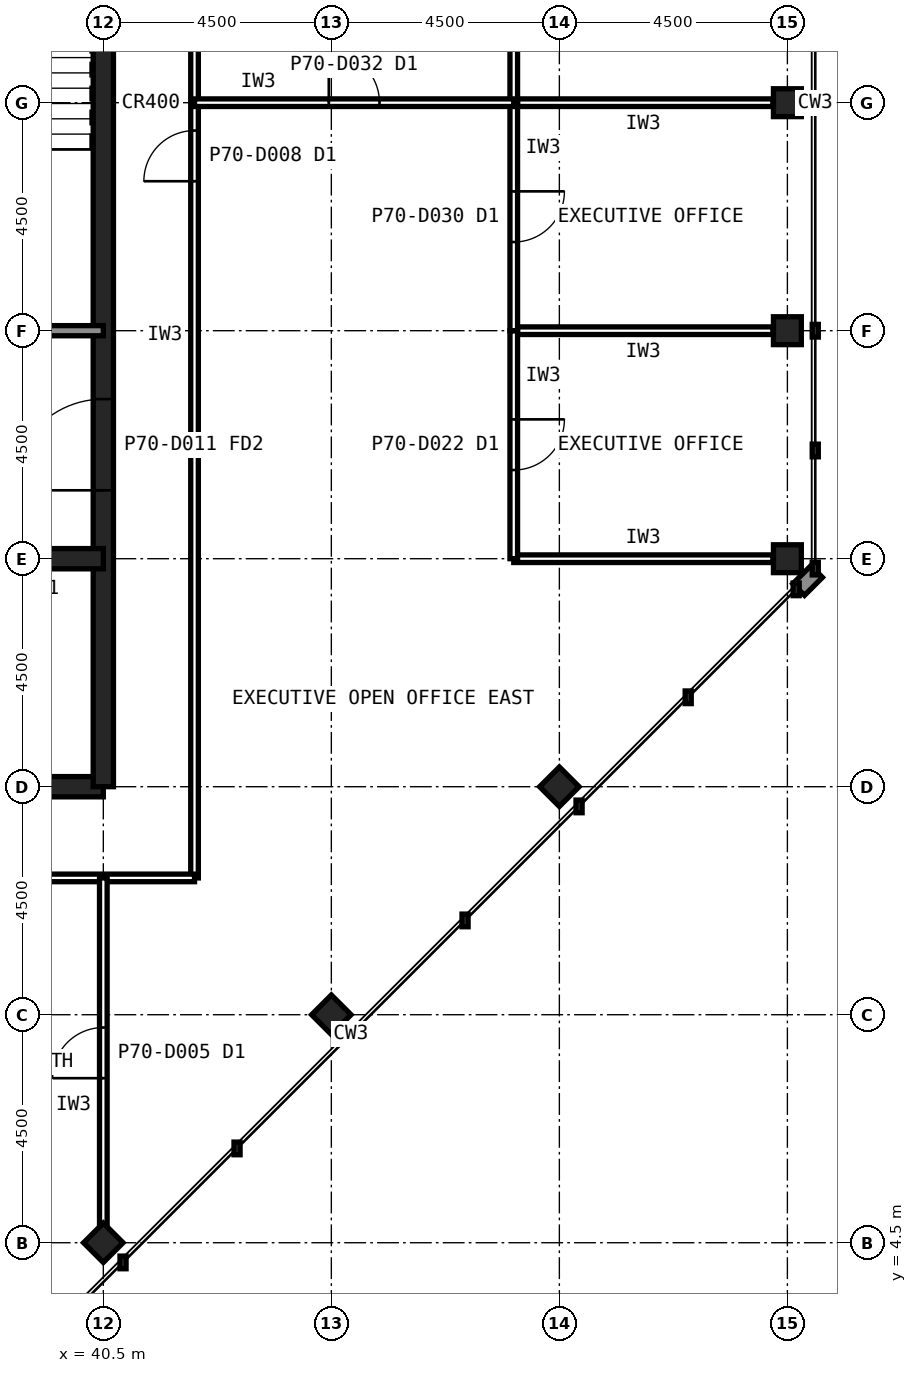
"""IFC4 building model, lengths in metres.
Left out: names, types, materials, properties, quantities, classifications, styles, units other than length and angle.
Written with IfcOpenShell. Run it as: python <this file> out.ifc"""

import sys

from ifc_helpers import new_model, si_unit, direction, frame, frame_2d, origin, origin_2d, place, context, subcontext, project, spatial, rectangle, hollow_rectangle, extrude, element, fill, save


model = new_model("IFC4")
c1 = context("Model", 3, precision=1e-05, world=origin(), true_north=direction((0.0, 1.0)))
c2 = subcontext(c1, "Body", "Model", "MODEL_VIEW")
j1 = project(units=[si_unit("LENGTHUNIT", "METRE"), si_unit("PLANEANGLEUNIT", "RADIAN")], contexts=[c1])
p1 = place(None, origin())
s1 = spatial("IfcSite", under=j1, at=p1, CompositionType="ELEMENT")
p2 = place(p1, origin())
s2 = spatial("IfcBuilding", under=s1, at=p2, CompositionType="ELEMENT")
p3 = place(p2, frame((0.0, 0.0, 294.6)))
s3 = spatial("IfcBuildingStorey", under=s2, at=p3, CompositionType="ELEMENT", Elevation=294.6)
for number, where, z_axis, x_axis in (
    (1, (54.0, 18.0, 0.0), (0.0, 0.0, 1.0), (1.0, 0.0, 0.0)),
    (2, (54.0, 22.5, 0.0), (0.0, 0.0, 1.0), (1.0, 0.0, 0.0)),
    (3, (54.0, 27.0, 0.0), (0.0, 0.0, 1.0), (1.0, 0.0, 0.0)),
    (4, (40.5, 4.5, 0.0), (0.0, 0.0, 1.0), (0.707, 0.707, 0.0)),
    (5, (45.0, 9.0, 0.0), (0.0, 0.0, 1.0), (0.707, 0.707, 0.0)),
    (6, (49.5, 13.5, 0.0), (0.0, 0.0, 1.0), (0.707, 0.707, 0.0)),
):
    element("IfcColumn", number, at=place(p3, frame(where, z_axis=z_axis, x_axis=x_axis)), inside=s3, PredefinedType="COLUMN", context=c2, shape_type="SweptSolid", body=[
        extrude(hollow_rectangle(XDim=0.55, YDim=0.55, WallThickness=0.025, at=origin_2d()), origin(), (0.0, 0.0, 1.0), 4.0),
    ])
p4 = place(p3, frame((13.5, 13.5, 0.0), z_axis=(0.0, 0.0, 1.0), x_axis=(1.0, 0.0, 0.0)))
e7 = element("IfcWall", 7, at=p4, inside=s3, PredefinedType="SHEAR", context=c2, shape_type="SweptSolid", body=[
    extrude(rectangle(XDim=27.0, YDim=0.4, at=frame_2d((13.5, 0.0))), origin(), (0.0, 0.0, 1.0), 4.0),
])
p5 = place(p3, frame((40.5, 13.5, 0.0), z_axis=(0.0, 0.0, 1.0), x_axis=(0.0, 1.0, 0.0)))
e8 = element("IfcWall", 8, at=p5, inside=s3, PredefinedType="SHEAR", context=c2, shape_type="SweptSolid", body=[
    extrude(rectangle(XDim=27.0, YDim=0.4, at=frame_2d((13.5, 0.0))), origin(), (0.0, 0.0, 1.0), 4.0),
])
p6 = place(p5, frame((5.85, 0.0, 0.0)))
e9 = element("IfcOpeningElement", 9, at=p6, cuts=e8, PredefinedType="OPENING", context=c2, shape_type="SweptSolid", body=[
    extrude(rectangle(XDim=1.8, YDim=2.1, at=frame_2d((0.9, 1.05))), frame((0.0, 0.21, 0.0), z_axis=(0.0, -1.0, 0.0), x_axis=(1.0, 0.0, 0.0)), (0.0, 0.0, 1.0), 0.42),
])
p7 = place(p5, frame((19.65, 0.0, 0.0)))
e10 = element("IfcOpeningElement", 10, at=p7, cuts=e8, PredefinedType="OPENING", context=c2, shape_type="SweptSolid", body=[
    extrude(rectangle(XDim=1.2, YDim=2.1, at=frame_2d((0.6, 1.05))), frame((0.0, 0.21, 0.0), z_axis=(0.0, -1.0, 0.0), x_axis=(1.0, 0.0, 0.0)), (0.0, 0.0, 1.0), 0.42),
])
p8 = place(p3, frame((13.5, 18.0, 0.0), z_axis=(0.0, 0.0, 1.0), x_axis=(1.0, 0.0, 0.0)))
e11 = element("IfcWall", 11, at=p8, inside=s3, PredefinedType="SHEAR", context=c2, shape_type="SweptSolid", body=[
    extrude(rectangle(XDim=27.0, YDim=0.4, at=frame_2d((13.5, 0.0))), origin(), (0.0, 0.0, 1.0), 4.0),
])
p9 = place(p8, frame((24.3, 0.0, 0.0)))
e12 = element("IfcOpeningElement", 12, at=p9, cuts=e11, PredefinedType="OPENING", context=c2, shape_type="SweptSolid", body=[
    extrude(rectangle(XDim=0.9, YDim=2.1, at=frame_2d((0.45, 1.05))), frame((0.0, 0.21, 0.0), z_axis=(0.0, -1.0, 0.0), x_axis=(1.0, 0.0, 0.0)), (0.0, 0.0, 1.0), 0.42),
])
p10 = place(p8, frame((5.45, 0.0, 0.0)))
e13 = element("IfcOpeningElement", 13, at=p10, cuts=e11, PredefinedType="OPENING", context=c2, shape_type="SweptSolid", body=[
    extrude(rectangle(XDim=1.1, YDim=2.1, at=frame_2d((0.55, 1.05))), frame((0.0, 0.21, 0.0), z_axis=(0.0, -1.0, 0.0), x_axis=(1.0, 0.0, 0.0)), (0.0, 0.0, 1.0), 0.42),
])
p11 = place(p8, frame((8.45, 0.0, 0.0)))
e14 = element("IfcOpeningElement", 14, at=p11, cuts=e11, PredefinedType="OPENING", context=c2, shape_type="SweptSolid", body=[
    extrude(rectangle(XDim=1.1, YDim=2.1, at=frame_2d((0.55, 1.05))), frame((0.0, 0.21, 0.0), z_axis=(0.0, -1.0, 0.0), x_axis=(1.0, 0.0, 0.0)), (0.0, 0.0, 1.0), 0.42),
])
p12 = place(p8, frame((11.45, 0.0, 0.0)))
e15 = element("IfcOpeningElement", 15, at=p12, cuts=e11, PredefinedType="OPENING", context=c2, shape_type="SweptSolid", body=[
    extrude(rectangle(XDim=1.1, YDim=2.1, at=frame_2d((0.55, 1.05))), frame((0.0, 0.21, 0.0), z_axis=(0.0, -1.0, 0.0), x_axis=(1.0, 0.0, 0.0)), (0.0, 0.0, 1.0), 0.42),
])
p13 = place(p8, frame((14.45, 0.0, 0.0)))
e16 = element("IfcOpeningElement", 16, at=p13, cuts=e11, PredefinedType="OPENING", context=c2, shape_type="SweptSolid", body=[
    extrude(rectangle(XDim=1.1, YDim=2.1, at=frame_2d((0.55, 1.05))), frame((0.0, 0.21, 0.0), z_axis=(0.0, -1.0, 0.0), x_axis=(1.0, 0.0, 0.0)), (0.0, 0.0, 1.0), 0.42),
])
p14 = place(p8, frame((17.45, 0.0, 0.0)))
e17 = element("IfcOpeningElement", 17, at=p14, cuts=e11, PredefinedType="OPENING", context=c2, shape_type="SweptSolid", body=[
    extrude(rectangle(XDim=1.1, YDim=2.1, at=frame_2d((0.55, 1.05))), frame((0.0, 0.21, 0.0), z_axis=(0.0, -1.0, 0.0), x_axis=(1.0, 0.0, 0.0)), (0.0, 0.0, 1.0), 0.42),
])
p15 = place(p8, frame((20.45, 0.0, 0.0)))
e18 = element("IfcOpeningElement", 18, at=p15, cuts=e11, PredefinedType="OPENING", context=c2, shape_type="SweptSolid", body=[
    extrude(rectangle(XDim=1.1, YDim=2.1, at=frame_2d((0.55, 1.05))), frame((0.0, 0.21, 0.0), z_axis=(0.0, -1.0, 0.0), x_axis=(1.0, 0.0, 0.0)), (0.0, 0.0, 1.0), 0.42),
])
p16 = place(p8, frame((1.6, 0.0, 0.0)))
e19 = element("IfcOpeningElement", 19, at=p16, cuts=e11, PredefinedType="OPENING", context=c2, shape_type="SweptSolid", body=[
    extrude(rectangle(XDim=1.3, YDim=2.2, at=frame_2d((0.65, 1.1))), frame((0.0, 0.21, 0.0), z_axis=(0.0, -1.0, 0.0), x_axis=(1.0, 0.0, 0.0)), (0.0, 0.0, 1.0), 0.42),
])
p17 = place(p3, frame((13.5, 22.5, 0.0), z_axis=(0.0, 0.0, 1.0), x_axis=(1.0, 0.0, 0.0)))
e20 = element("IfcWall", 20, at=p17, inside=s3, PredefinedType="SOLIDWALL", context=c2, shape_type="SweptSolid", body=[
    extrude(rectangle(XDim=27.0, YDim=0.2, at=frame_2d((13.5, 0.0))), origin(), (0.0, 0.0, 1.0), 3.84),
])
p18 = place(p17, frame((1.65, 0.0, 0.0)))
e21 = element("IfcOpeningElement", 21, at=p18, cuts=e20, PredefinedType="OPENING", context=c2, shape_type="SweptSolid", body=[
    extrude(rectangle(XDim=1.2, YDim=2.1, at=frame_2d((0.6, 1.05))), frame((0.0, 0.11, 0.0), z_axis=(0.0, -1.0, 0.0), x_axis=(1.0, 0.0, 0.0)), (0.0, 0.0, 1.0), 0.22),
])
p19 = place(p17, frame((6.025, 0.0, 0.0)))
e22 = element("IfcOpeningElement", 22, at=p19, cuts=e20, PredefinedType="OPENING", context=c2, shape_type="SweptSolid", body=[
    extrude(rectangle(XDim=1.0, YDim=2.1, at=frame_2d((0.5, 1.05))), frame((0.0, 0.11, 0.0), z_axis=(0.0, -1.0, 0.0), x_axis=(1.0, 0.0, 0.0)), (0.0, 0.0, 1.0), 0.22),
])
p20 = place(p17, frame((10.525, 0.0, 0.0)))
e23 = element("IfcOpeningElement", 23, at=p20, cuts=e20, PredefinedType="OPENING", context=c2, shape_type="SweptSolid", body=[
    extrude(rectangle(XDim=1.0, YDim=2.1, at=frame_2d((0.5, 1.05))), frame((0.0, 0.11, 0.0), z_axis=(0.0, -1.0, 0.0), x_axis=(1.0, 0.0, 0.0)), (0.0, 0.0, 1.0), 0.22),
])
p21 = place(p17, frame((19.75, 0.0, 0.0)))
e24 = element("IfcOpeningElement", 24, at=p21, cuts=e20, PredefinedType="OPENING", context=c2, shape_type="SweptSolid", body=[
    extrude(rectangle(XDim=1.0, YDim=2.1, at=frame_2d((0.5, 1.05))), frame((0.0, 0.11, 0.0), z_axis=(0.0, -1.0, 0.0), x_axis=(1.0, 0.0, 0.0)), (0.0, 0.0, 1.0), 0.22),
])
p22 = place(p17, frame((15.05, 0.0, 0.0)))
e25 = element("IfcOpeningElement", 25, at=p22, cuts=e20, PredefinedType="OPENING", context=c2, shape_type="SweptSolid", body=[
    extrude(rectangle(XDim=1.4, YDim=2.4, at=frame_2d((0.7, 1.2))), frame((0.0, 0.11, 0.0), z_axis=(0.0, -1.0, 0.0), x_axis=(1.0, 0.0, 0.0)), (0.0, 0.0, 1.0), 0.22),
])
p23 = place(p3, frame((42.3, 11.7, 0.0), z_axis=(0.0, 0.0, 1.0), x_axis=(0.0, 1.0, 0.0)))
e26 = element("IfcWall", 26, at=p23, inside=s3, PredefinedType="PARTITIONING", context=c2, shape_type="SweptSolid", body=[
    extrude(rectangle(XDim=30.6, YDim=0.15, at=frame_2d((15.3, 0.0))), origin(), (0.0, 0.0, 1.0), 3.84),
])
p24 = place(p23, frame((13.75, 0.0, 0.0)))
e27 = element("IfcOpeningElement", 27, at=p24, cuts=e26, PredefinedType="OPENING", context=c2, shape_type="SweptSolid", body=[
    extrude(rectangle(XDim=1.0, YDim=2.1, at=frame_2d((0.5, 1.05))), frame((0.0, 0.085, 0.0), z_axis=(0.0, -1.0, 0.0), x_axis=(1.0, 0.0, 0.0)), (0.0, 0.0, 1.0), 0.17),
])
p25 = place(p3, frame((28.8, 11.7, 0.0), z_axis=(0.0, 0.0, 1.0), x_axis=(1.0, 0.0, 0.0)))
e28 = element("IfcWall", 28, at=p25, inside=s3, PredefinedType="PARTITIONING", context=c2, shape_type="SweptSolid", body=[
    extrude(rectangle(XDim=13.5, YDim=0.15, at=frame_2d((6.75, 0.0))), origin(), (0.0, 0.0, 1.0), 3.84),
])
p26 = place(p25, frame((6.25, 0.0, 0.0)))
e29 = element("IfcOpeningElement", 29, at=p26, cuts=e28, PredefinedType="OPENING", context=c2, shape_type="SweptSolid", body=[
    extrude(rectangle(XDim=1.0, YDim=2.1, at=frame_2d((0.5, 1.05))), frame((0.0, 0.085, 0.0), z_axis=(0.0, -1.0, 0.0), x_axis=(1.0, 0.0, 0.0)), (0.0, 0.0, 1.0), 0.17),
])
for number, where, z_axis, x_axis in (
    (30, (48.6, 18.0, 0.0), (0.0, 0.0, 1.0), (1.0, 0.0, 0.0)),
    (31, (53.715, 22.5, 0.0), (0.0, 0.0, 1.0), (-1.0, 0.0, 0.0)),
):
    element("IfcWall", number, at=place(p3, frame(where, z_axis=z_axis, x_axis=x_axis)), inside=s3, PredefinedType="PARTITIONING", context=c2, shape_type="SweptSolid", body=[
        extrude(rectangle(XDim=5.115, YDim=0.15, at=frame_2d((2.558, 0.0))), origin(), (0.0, 0.0, 1.0), 2.989),
    ])
p27 = place(p3, frame((48.6, 22.5, 0.0), z_axis=(0.0, 0.0, 1.0), x_axis=(0.0, -1.0, 0.0)))
e32 = element("IfcWall", 32, at=p27, inside=s3, PredefinedType="PARTITIONING", context=c2, shape_type="SweptSolid", body=[
    extrude(rectangle(XDim=4.5, YDim=0.15, at=frame_2d((2.25, 0.0))), origin(), (0.0, 0.0, 1.0), 3.84),
])
p28 = place(p27, frame((1.75, 0.0, 0.0)))
e33 = element("IfcOpeningElement", 33, at=p28, cuts=e32, PredefinedType="OPENING", context=c2, shape_type="SweptSolid", body=[
    extrude(rectangle(XDim=1.0, YDim=2.1, at=frame_2d((0.5, 1.05))), frame((0.0, 0.085, 0.0), z_axis=(0.0, -1.0, 0.0), x_axis=(1.0, 0.0, 0.0)), (0.0, 0.0, 1.0), 0.17),
])
p29 = place(p3, frame((53.715, 27.0, 0.0), z_axis=(0.0, 0.0, 1.0), x_axis=(-1.0, 0.0, 0.0)))
e34 = element("IfcWall", 34, at=p29, inside=s3, PredefinedType="PARTITIONING", context=c2, shape_type="SweptSolid", body=[
    extrude(rectangle(XDim=5.115, YDim=0.15, at=frame_2d((2.558, 0.0))), origin(), (0.0, 0.0, 1.0), 2.989),
])
p30 = place(p3, frame((48.6, 27.0, 0.0), z_axis=(0.0, 0.0, 1.0), x_axis=(0.0, -1.0, 0.0)))
e35 = element("IfcWall", 35, at=p30, inside=s3, PredefinedType="PARTITIONING", context=c2, shape_type="SweptSolid", body=[
    extrude(rectangle(XDim=4.5, YDim=0.15, at=frame_2d((2.25, 0.0))), origin(), (0.0, 0.0, 1.0), 3.84),
])
p31 = place(p30, frame((1.75, 0.0, 0.0)))
e36 = element("IfcOpeningElement", 36, at=p31, cuts=e35, PredefinedType="OPENING", context=c2, shape_type="SweptSolid", body=[
    extrude(rectangle(XDim=1.0, YDim=2.1, at=frame_2d((0.5, 1.05))), frame((0.0, 0.085, 0.0), z_axis=(0.0, -1.0, 0.0), x_axis=(1.0, 0.0, 0.0)), (0.0, 0.0, 1.0), 0.17),
])
p32 = place(p3, frame((48.6, 31.5, 0.0), z_axis=(0.0, 0.0, 1.0), x_axis=(0.0, -1.0, 0.0)))
e37 = element("IfcWall", 37, at=p32, inside=s3, PredefinedType="PARTITIONING", context=c2, shape_type="SweptSolid", body=[
    extrude(rectangle(XDim=4.5, YDim=0.15, at=frame_2d((2.25, 0.0))), origin(), (0.0, 0.0, 1.0), 3.84),
])
p33 = place(p32, frame((1.75, 0.0, 0.0)))
e38 = element("IfcOpeningElement", 38, at=p33, cuts=e37, PredefinedType="OPENING", context=c2, shape_type="SweptSolid", body=[
    extrude(rectangle(XDim=1.0, YDim=2.1, at=frame_2d((0.5, 1.05))), frame((0.0, 0.085, 0.0), z_axis=(0.0, -1.0, 0.0), x_axis=(1.0, 0.0, 0.0)), (0.0, 0.0, 1.0), 0.17),
])
p34 = place(p3, frame((40.5, 4.795, 0.0), z_axis=(0.0, 0.0, 1.0), x_axis=(0.0, 1.0, 0.0)))
e39 = element("IfcWall", 39, at=p34, inside=s3, PredefinedType="PARTITIONING", context=c2, shape_type="SweptSolid", body=[
    extrude(rectangle(XDim=6.905, YDim=0.15, at=frame_2d((3.453, 0.0))), origin(), (0.0, 0.0, 1.0), 2.989),
])
p35 = place(p34, frame((2.952, 0.0, 0.0)))
e40 = element("IfcOpeningElement", 40, at=p35, cuts=e39, PredefinedType="OPENING", context=c2, shape_type="SweptSolid", body=[
    extrude(rectangle(XDim=1.0, YDim=2.1, at=frame_2d((0.5, 1.05))), frame((0.0, 0.085, 0.0), z_axis=(0.0, -1.0, 0.0), x_axis=(1.0, 0.0, 0.0)), (0.0, 0.0, 1.0), 0.17),
])
p36 = place(p3, frame((42.3, 27.0, 0.0), z_axis=(0.0, 0.0, 1.0), x_axis=(1.0, 0.0, 0.0)))
e41 = element("IfcWall", 41, at=p36, inside=s3, PredefinedType="PARTITIONING", context=c2, shape_type="SweptSolid", body=[
    extrude(rectangle(XDim=6.3, YDim=0.15, at=frame_2d((3.15, 0.0))), origin(), (0.0, 0.0, 1.0), 2.989),
])
p37 = place(p36, frame((2.65, 0.0, 0.0)))
e42 = element("IfcOpeningElement", 42, at=p37, cuts=e41, PredefinedType="OPENING", context=c2, shape_type="SweptSolid", body=[
    extrude(rectangle(XDim=1.0, YDim=2.1, at=frame_2d((0.5, 1.05))), frame((0.0, 0.085, 0.0), z_axis=(0.0, -1.0, 0.0), x_axis=(1.0, 0.0, 0.0)), (0.0, 0.0, 1.0), 0.17),
])
p38 = place(p6, origin())
e43 = element("IfcDoor", 43, at=p38, inside=s3, OperationType="SINGLE_SWING_LEFT", PredefinedType="DOOR", context=c2, shape_type="SweptSolid", body=[
    extrude(rectangle(XDim=1.8, YDim=2.1, at=frame_2d((0.9, 1.05))), frame((0.0, 0.025, 0.0), z_axis=(0.0, -1.0, 0.0), x_axis=(1.0, 0.0, 0.0)), (0.0, 0.0, 1.0), 0.05),
])
fill(e9, e43)
p39 = place(p24, origin())
e44 = element("IfcDoor", 44, at=p39, inside=s3, OperationType="SINGLE_SWING_LEFT", PredefinedType="DOOR", context=c2, shape_type="SweptSolid", body=[
    extrude(rectangle(XDim=1.0, YDim=2.1, at=frame_2d((0.5, 1.05))), frame((0.0, 0.025, 0.0), z_axis=(0.0, -1.0, 0.0), x_axis=(1.0, 0.0, 0.0)), (0.0, 0.0, 1.0), 0.05),
])
fill(e27, e44)
p40 = place(p28, origin())
e45 = element("IfcDoor", 45, at=p40, inside=s3, OperationType="SINGLE_SWING_LEFT", PredefinedType="DOOR", context=c2, shape_type="SweptSolid", body=[
    extrude(rectangle(XDim=1.0, YDim=2.1, at=frame_2d((0.5, 1.05))), frame((0.0, 0.025, 0.0), z_axis=(0.0, -1.0, 0.0), x_axis=(1.0, 0.0, 0.0)), (0.0, 0.0, 1.0), 0.05),
])
fill(e33, e45)
p41 = place(p31, origin())
e46 = element("IfcDoor", 46, at=p41, inside=s3, OperationType="SINGLE_SWING_LEFT", PredefinedType="DOOR", context=c2, shape_type="SweptSolid", body=[
    extrude(rectangle(XDim=1.0, YDim=2.1, at=frame_2d((0.5, 1.05))), frame((0.0, 0.025, 0.0), z_axis=(0.0, -1.0, 0.0), x_axis=(1.0, 0.0, 0.0)), (0.0, 0.0, 1.0), 0.05),
])
fill(e36, e46)
p42 = place(p35, origin())
e47 = element("IfcDoor", 47, at=p42, inside=s3, OperationType="SINGLE_SWING_LEFT", PredefinedType="DOOR", context=c2, shape_type="SweptSolid", body=[
    extrude(rectangle(XDim=1.0, YDim=2.1, at=frame_2d((0.5, 1.05))), frame((0.0, 0.025, 0.0), z_axis=(0.0, -1.0, 0.0), x_axis=(1.0, 0.0, 0.0)), (0.0, 0.0, 1.0), 0.05),
])
fill(e40, e47)
p43 = place(p37, origin())
e48 = element("IfcDoor", 48, at=p43, inside=s3, OperationType="SINGLE_SWING_LEFT", PredefinedType="DOOR", context=c2, shape_type="SweptSolid", body=[
    extrude(rectangle(XDim=1.0, YDim=2.1, at=frame_2d((0.5, 1.05))), frame((0.0, 0.025, 0.0), z_axis=(0.0, -1.0, 0.0), x_axis=(1.0, 0.0, 0.0)), (0.0, 0.0, 1.0), 0.05),
])
fill(e42, e48)
save(model, sys.argv[1])
